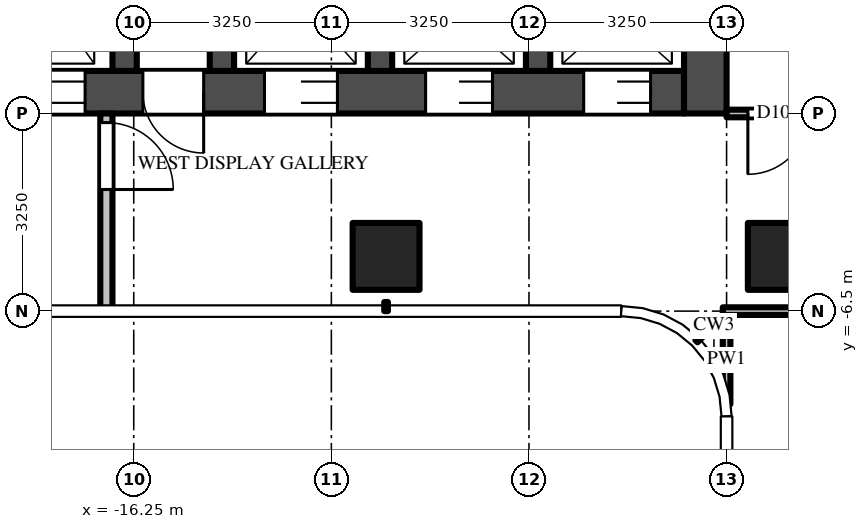
"""IFC4 building model, lengths in metres.
Left out: names, types, materials, properties, quantities, classifications, styles, units other than length and angle.
Written with IfcOpenShell. Run it as: python <this file> out.ifc"""

import sys

from ifc_helpers import new_model, si_unit, direction, frame, frame_2d, origin, origin_2d, place, context, subcontext, project, spatial, rectangle, extrude, source, transform, mapped, element, fill, save


model = new_model("IFC4")
c1 = context("Model", 3, precision=1e-05, world=origin(), true_north=direction((0.0, 1.0)))
c2 = subcontext(c1, "Body", "Model", "MODEL_VIEW")
j1 = project(units=[si_unit("LENGTHUNIT", "METRE"), si_unit("PLANEANGLEUNIT", "RADIAN")], contexts=[c1])
p1 = place(None, origin())
s1 = spatial("IfcSite", under=j1, at=p1, CompositionType="ELEMENT")
p2 = place(p1, origin())
s2 = spatial("IfcBuilding", under=s1, at=p2, CompositionType="ELEMENT")
p3 = place(p2, frame((0.0, 0.0, 236.3)))
s3 = spatial("IfcBuildingStorey", under=s2, at=p3, CompositionType="ELEMENT", Elevation=236.3)
m1 = source(origin(), c2, "Body", "SweptSolid", [
    extrude(rectangle(XDim=1.1, YDim=1.1, at=origin_2d()), origin(), (0.0, 0.0, 1.0), 3.9),
])
for number, where, z_axis, x_axis in (
    (1, (-5.6, -5.6, 0.0), (0.0, 0.0, 1.0), (1.0, 0.0, 0.0)),
    (2, (-12.1, -5.6, 0.0), (0.0, 0.0, 1.0), (1.0, 0.0, 0.0)),
):
    element("IfcColumn", number, at=place(p3, frame(where, z_axis=z_axis, x_axis=x_axis)), inside=s3, PredefinedType="COLUMN", context=c2, shape_type="MappedRepresentation", body=[
        mapped(m1, transform((0.0, 0.0, 0.0))),
    ])
m2 = source(origin(), c2, "Body", "SweptSolid", [
    extrude(rectangle(XDim=14.85, YDim=0.7, at=frame_2d((7.425, 0.0))), origin(), (0.0, 0.0, 1.0), 3.7),
])
p4 = place(p3, frame((-7.2, -2.9, 0.0), z_axis=(0.0, 0.0, 1.0), x_axis=(-1.0, 0.0, 0.0)))
e3 = element("IfcWall", 3, at=p4, inside=s3, PredefinedType="SHEAR", context=c2, shape_type="MappedRepresentation", body=[
    mapped(m2, transform((0.0, 0.0, 0.0))),
])
m3 = source(origin(), c2, "Body", "SweptSolid", [
    extrude(rectangle(XDim=1.1, YDim=2.1, at=frame_2d((0.55, 1.05))), frame((0.0, 0.36, 0.0), z_axis=(0.0, -1.0, 0.0), x_axis=(1.0, 0.0, 0.0)), (0.0, 0.0, 1.0), 0.72),
])
p5 = place(p4, frame((0.55, 0.0, 0.0)))
e4 = element("IfcOpeningElement", 4, at=p5, cuts=e3, PredefinedType="OPENING", context=c2, shape_type="MappedRepresentation", body=[
    mapped(m3, transform((0.0, 0.0, 0.0))),
])
p6 = place(p4, frame((3.15, 0.0, 0.0)))
e5 = element("IfcOpeningElement", 5, at=p6, cuts=e3, PredefinedType="OPENING", context=c2, shape_type="MappedRepresentation", body=[
    mapped(m3, transform((0.0, 0.0, 0.0))),
])
m4 = source(origin(), c2, "Body", "SweptSolid", [
    extrude(rectangle(XDim=1.2, YDim=2.1, at=frame_2d((0.6, 1.05))), frame((0.0, 0.36, 0.0), z_axis=(0.0, -1.0, 0.0), x_axis=(1.0, 0.0, 0.0)), (0.0, 0.0, 1.0), 0.72),
])
p7 = place(p4, frame((5.7, 0.0, 0.0)))
e6 = element("IfcOpeningElement", 6, at=p7, cuts=e3, PredefinedType="OPENING", context=c2, shape_type="MappedRepresentation", body=[
    mapped(m4, transform((0.0, 0.0, 0.0))),
])
m5 = source(origin(), c2, "Body", "SweptSolid", [
    extrude(rectangle(XDim=1.3, YDim=2.1, at=frame_2d((0.65, 1.05))), frame((0.0, 0.36, 0.0), z_axis=(0.0, -1.0, 0.0), x_axis=(1.0, 0.0, 0.0)), (0.0, 0.0, 1.0), 0.72),
])
p8 = place(p4, frame((12.2, 0.0, 0.0)))
e7 = element("IfcOpeningElement", 7, at=p8, cuts=e3, PredefinedType="OPENING", context=c2, shape_type="MappedRepresentation", body=[
    mapped(m5, transform((0.0, 0.0, 0.0))),
])
p9 = place(p4, frame((9.85, 0.0, 0.0)))
e8 = element("IfcOpeningElement", 8, at=p9, cuts=e3, PredefinedType="OPENING", context=c2, shape_type="MappedRepresentation", body=[
    mapped(m4, transform((0.0, 0.0, 0.0))),
])
m6 = source(origin(), c2, "Body", "SweptSolid", [
    extrude(rectangle(XDim=1.0, YDim=2.1, at=frame_2d((0.5, 1.05))), frame((0.0, 0.36, 0.0), z_axis=(0.0, -1.0, 0.0), x_axis=(1.0, 0.0, 0.0)), (0.0, 0.0, 1.0), 0.72),
])
p10 = place(p4, frame((7.9, 0.0, 0.0)))
e9 = element("IfcOpeningElement", 9, at=p10, cuts=e3, PredefinedType="OPENING", context=c2, shape_type="MappedRepresentation", body=[
    mapped(m6, transform((0.0, 0.0, 0.0))),
])
m7 = source(origin(), c2, "Body", "SweptSolid", [
    extrude(rectangle(XDim=9.05, YDim=0.7, at=frame_2d((4.525, 0.0))), origin(), (0.0, 0.0, 1.0), 3.7),
])
p11 = place(p3, frame((-6.85, 5.8, 0.0), z_axis=(0.0, 0.0, 1.0), x_axis=(0.0, -1.0, 0.0)))
e10 = element("IfcWall", 10, at=p11, inside=s3, PredefinedType="SHEAR", context=c2, shape_type="MappedRepresentation", body=[
    mapped(m7, transform((0.0, 0.0, 0.0))),
])
m8 = source(origin(), c2, "Body", "SweptSolid", [
    extrude(rectangle(XDim=1.8, YDim=2.1, at=frame_2d((0.9, 1.05))), frame((0.0, 0.36, 0.0), z_axis=(0.0, -1.0, 0.0), x_axis=(1.0, 0.0, 0.0)), (0.0, 0.0, 1.0), 0.72),
])
p12 = place(p11, frame((3.15, 0.0, 0.0)))
e11 = element("IfcOpeningElement", 11, at=p12, cuts=e10, PredefinedType="OPENING", context=c2, shape_type="MappedRepresentation", body=[
    mapped(m8, transform((0.0, 0.0, 0.0))),
])
m9 = source(origin(), c2, "Body", "SweptSolid", [
    extrude(rectangle(XDim=2.45, YDim=0.4, at=frame_2d((1.225, 0.0))), origin(), (0.0, 0.0, 1.0), 3.7),
])
for number, where, z_axis, x_axis in (
    (12, (-9.6, -0.1, 0.0), (0.0, 0.0, 1.0), (0.0, -1.0, 0.0)),
    (13, (-12.2, -0.1, 0.0), (0.0, 0.0, 1.0), (0.0, -1.0, 0.0)),
    (14, (-14.8, -0.1, 0.0), (0.0, 0.0, 1.0), (0.0, -1.0, 0.0)),
    (15, (-16.4, -0.1, 0.0), (0.0, 0.0, 1.0), (0.0, -1.0, 0.0)),
):
    element("IfcWall", number, at=place(p3, frame(where, z_axis=z_axis, x_axis=x_axis)), inside=s3, PredefinedType="SHEAR", context=c2, shape_type="MappedRepresentation", body=[
        mapped(m9, transform((0.0, 0.0, 0.0))),
    ])
m10 = source(origin(), c2, "Body", "SweptSolid", [
    extrude(rectangle(XDim=3.25, YDim=0.2, at=frame_2d((1.625, 0.0))), origin(), (0.0, 0.0, 1.0), 3.7),
])
p13 = place(p3, frame((-16.7, -3.25, 0.0), z_axis=(0.0, 0.0, 1.0), x_axis=(0.0, -1.0, 0.0)))
e16 = element("IfcWall", 16, at=p13, inside=s3, PredefinedType="PARTITIONING", context=c2, shape_type="MappedRepresentation", body=[
    mapped(m10, transform((0.0, 0.0, 0.0))),
])
m11 = source(origin(), c2, "Body", "SweptSolid", [
    extrude(rectangle(XDim=1.1, YDim=2.1, at=frame_2d((0.55, 1.05))), frame((0.0, 0.11, 0.0), z_axis=(0.0, -1.0, 0.0), x_axis=(1.0, 0.0, 0.0)), (0.0, 0.0, 1.0), 0.22),
])
p14 = place(p13, frame((0.15, 0.0, 0.0)))
e17 = element("IfcOpeningElement", 17, at=p14, cuts=e16, PredefinedType="OPENING", context=c2, shape_type="MappedRepresentation", body=[
    mapped(m11, transform((0.0, 0.0, 0.0))),
])
m12 = source(origin(), c2, "Body", "SweptSolid", [
    extrude(rectangle(XDim=1.469, YDim=0.125, at=frame_2d((0.734, 0.0))), origin(), (0.0, 0.0, 1.0), 3.7),
])
p15 = place(p3, frame((-6.5, -6.562, 0.0), z_axis=(0.0, 0.0, 1.0), x_axis=(0.0, -1.0, 0.0)))
e18 = element("IfcWall", 18, at=p15, inside=s3, PredefinedType="PARTITIONING", context=c2, shape_type="MappedRepresentation", body=[
    mapped(m12, transform((0.0, 0.0, 0.0))),
])
m13 = source(origin(), c2, "Body", "SweptSolid", [
    extrude(rectangle(XDim=3.725, YDim=0.125, at=frame_2d((1.863, 0.0))), origin(), (0.0, 0.0, 1.0), 2.78),
])
p16 = place(p3, frame((-2.837, -6.5, 0.0), z_axis=(0.0, 0.0, 1.0), x_axis=(-1.0, 0.0, 0.0)))
e19 = element("IfcWall", 19, at=p16, inside=s3, PredefinedType="PARTITIONING", context=c2, shape_type="MappedRepresentation", body=[
    mapped(m13, transform((0.0, 0.0, 0.0))),
])
m14 = source(origin(), c2, "Body", "SweptSolid", [
    extrude(rectangle(XDim=5.363, YDim=0.125, at=frame_2d((2.681, 0.0))), origin(), (0.0, 0.0, 1.0), 2.996),
])
p17 = place(p3, frame((-1.137, -3.25, 0.0), z_axis=(0.0, 0.0, 1.0), x_axis=(-1.0, 0.0, 0.0)))
e20 = element("IfcWall", 20, at=p17, inside=s3, PredefinedType="PARTITIONING", context=c2, shape_type="MappedRepresentation", body=[
    mapped(m14, transform((0.0, 0.0, 0.0))),
])
m15 = source(origin(), c2, "Body", "SweptSolid", [
    extrude(rectangle(XDim=1.0, YDim=2.1, at=frame_2d((0.5, 1.05))), frame((0.0, 0.073, 0.0), z_axis=(0.0, -1.0, 0.0), x_axis=(1.0, 0.0, 0.0)), (0.0, 0.0, 1.0), 0.145),
])
p18 = place(p17, frame((4.012, 0.0, 0.0)))
e21 = element("IfcOpeningElement", 21, at=p18, cuts=e20, PredefinedType="OPENING", context=c2, shape_type="MappedRepresentation", body=[
    mapped(m15, transform((0.0, 0.0, 0.0))),
])
m16 = source(origin(), c2, "Body", "SweptSolid", [
    extrude(rectangle(XDim=1.1, YDim=2.1, at=frame_2d((0.55, 1.05))), frame((0.0, -0.275, 0.0), z_axis=(0.0, -1.0, 0.0), x_axis=(1.0, 0.0, 0.0)), (0.0, 0.0, 1.0), 0.05),
])
p19 = place(p5, origin())
e22 = element("IfcDoor", 22, at=p19, inside=s3, OperationType="DOUBLE_DOOR_SLIDING", PredefinedType="DOOR", context=c2, shape_type="MappedRepresentation", body=[
    mapped(m16, transform((0.0, 0.0, 0.0))),
])
fill(e4, e22)
p20 = place(p6, origin())
e23 = element("IfcDoor", 23, at=p20, inside=s3, OperationType="DOUBLE_DOOR_SLIDING", PredefinedType="DOOR", context=c2, shape_type="MappedRepresentation", body=[
    mapped(m16, transform((0.0, 0.0, 0.0))),
])
fill(e5, e23)
m17 = source(origin(), c2, "Body", "SweptSolid", [
    extrude(rectangle(XDim=1.2, YDim=2.1, at=frame_2d((0.6, 1.05))), frame((0.0, -0.275, 0.0), z_axis=(0.0, -1.0, 0.0), x_axis=(1.0, 0.0, 0.0)), (0.0, 0.0, 1.0), 0.05),
])
p21 = place(p7, origin())
e24 = element("IfcDoor", 24, at=p21, inside=s3, OperationType="DOUBLE_DOOR_SLIDING", PredefinedType="DOOR", context=c2, shape_type="MappedRepresentation", body=[
    mapped(m17, transform((0.0, 0.0, 0.0))),
])
fill(e6, e24)
p22 = place(p9, origin())
e25 = element("IfcDoor", 25, at=p22, inside=s3, OperationType="DOUBLE_DOOR_SLIDING", PredefinedType="DOOR", context=c2, shape_type="MappedRepresentation", body=[
    mapped(m17, transform((0.0, 0.0, 0.0))),
])
fill(e8, e25)
m18 = source(origin(), c2, "Body", "SweptSolid", [
    extrude(rectangle(XDim=1.0, YDim=2.1, at=frame_2d((0.5, 1.05))), frame((0.0, -0.275, 0.0), z_axis=(0.0, -1.0, 0.0), x_axis=(1.0, 0.0, 0.0)), (0.0, 0.0, 1.0), 0.05),
])
p23 = place(p10, origin())
e26 = element("IfcDoor", 26, at=p23, inside=s3, OperationType="SINGLE_SWING_LEFT", PredefinedType="DOOR", context=c2, shape_type="MappedRepresentation", body=[
    mapped(m18, transform((0.0, 0.0, 0.0))),
])
fill(e9, e26)
m19 = source(origin(), c2, "Body", "SweptSolid", [
    extrude(rectangle(XDim=1.1, YDim=2.1, at=frame_2d((0.55, 1.05))), frame((0.0, 0.025, 0.0), z_axis=(0.0, -1.0, 0.0), x_axis=(1.0, 0.0, 0.0)), (0.0, 0.0, 1.0), 0.05),
])
p24 = place(p14, origin())
e27 = element("IfcDoor", 27, at=p24, inside=s3, OperationType="SINGLE_SWING_RIGHT", PredefinedType="DOOR", context=c2, shape_type="MappedRepresentation", body=[
    mapped(m19, transform((0.0, 0.0, 0.0))),
])
fill(e17, e27)
m20 = source(origin(), c2, "Body", "SweptSolid", [
    extrude(rectangle(XDim=1.0, YDim=2.1, at=frame_2d((0.5, 1.05))), frame((0.0, 0.025, 0.0), z_axis=(0.0, -1.0, 0.0), x_axis=(1.0, 0.0, 0.0)), (0.0, 0.0, 1.0), 0.05),
])
p25 = place(p18, origin())
e28 = element("IfcDoor", 28, at=p25, inside=s3, OperationType="SINGLE_SWING_RIGHT", PredefinedType="DOOR", context=c2, shape_type="MappedRepresentation", body=[
    mapped(m20, transform((0.0, 0.0, 0.0))),
])
fill(e21, e28)
save(model, sys.argv[1])
